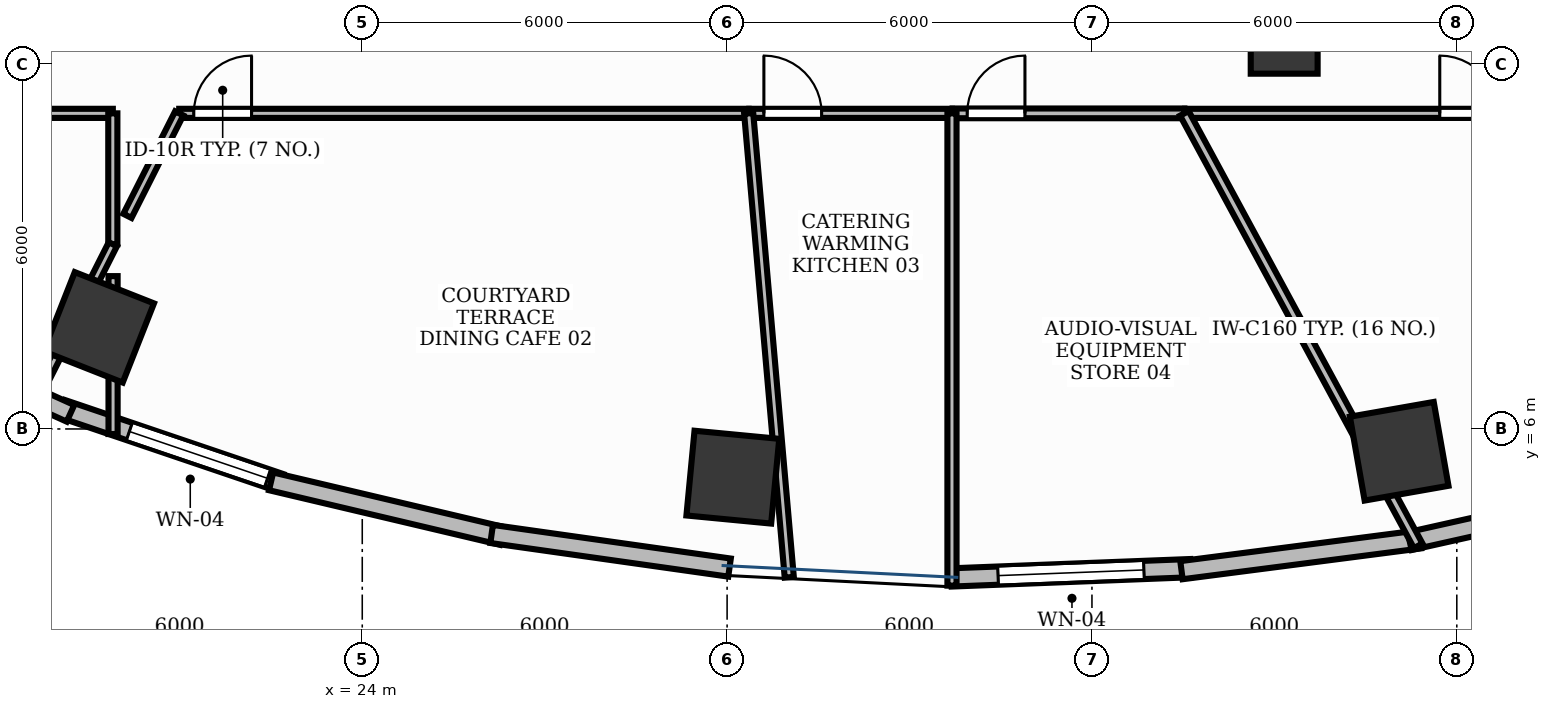
"""IFC4 building model, lengths in metres.
Left out: names, types, materials, properties, quantities, classifications, styles, units other than length and angle.
Written with IfcOpenShell. Run it as: python <this file> out.ifc"""

import sys

from ifc_helpers import new_model, si_unit, direction, frame, frame_2d, origin, origin_2d, place, context, subcontext, project, spatial, rectangle, extrude, element, fill, save


model = new_model("IFC4")
c1 = context("Model", 3, precision=1e-05, world=origin(), true_north=direction((0.0, 1.0)))
c2 = subcontext(c1, "Body", "Model", "MODEL_VIEW")
j1 = project(units=[si_unit("LENGTHUNIT", "METRE"), si_unit("PLANEANGLEUNIT", "RADIAN")], contexts=[c1])
p1 = place(None, origin())
s1 = spatial("IfcSite", under=j1, at=p1, CompositionType="ELEMENT")
p2 = place(p1, origin())
s2 = spatial("IfcBuilding", under=s1, at=p2, CompositionType="ELEMENT")
p3 = place(p2, frame((0.0, 0.0, 20.4)))
s3 = spatial("IfcBuildingStorey", under=s2, at=p3, CompositionType="ELEMENT", Elevation=20.4)
for number, where, z_axis, x_axis in (
    (1, (19.667, 7.671, -0.0), (0.0, 0.0, 1.0), (-0.93, 0.367, 0.0)),
    (2, (30.094, 5.208, -0.0), (0.0, 0.0, 1.0), (-0.995, 0.095, 0.0)),
    (3, (41.052, 5.633, -0.0), (0.0, 0.0, 1.0), (0.985, 0.173, 0.0)),
):
    element("IfcColumn", number, at=place(p3, frame(where, z_axis=z_axis, x_axis=x_axis)), inside=s3, PredefinedType="COLUMN", context=c2, shape_type="SweptSolid", body=[
        extrude(rectangle(XDim=1.4, YDim=1.4, at=origin_2d()), origin(), (0.0, 0.0, 1.0), 5.101),
    ])
p4 = place(p3, frame((39.161, 12.392, -0.0), z_axis=(0.0, 0.0, 1.0), x_axis=(1.0, 0.0, 0.0)))
e4 = element("IfcColumn", 4, at=p4, inside=s3, PredefinedType="COLUMN", context=c2, shape_type="SweptSolid", body=[
    extrude(rectangle(XDim=1.1, YDim=1.1, at=origin_2d()), origin(), (0.0, 0.0, 1.0), 5.101),
])
p5 = place(p3, frame((19.065, 6.333, 0.0), z_axis=(0.0, 0.0, 1.0), x_axis=(0.947034337234, -0.321132315564, 0.0)))
e5 = element("IfcWall", 5, at=p5, inside=s3, PredefinedType="STANDARD", context=c2, shape_type="SweptSolid", body=[
    extrude(rectangle(XDim=3.79, YDim=0.3, at=frame_2d((1.895, 0.0))), origin(), (0.0, 0.0, 1.0), 4.67),
])
p6 = place(p5, frame((1.166, 0.0, 1.5)))
e6 = element("IfcOpeningElement", 6, at=p6, cuts=e5, PredefinedType="OPENING", context=c2, shape_type="SweptSolid", body=[
    extrude(rectangle(XDim=2.4, YDim=1.2, at=frame_2d((1.2, 0.6))), frame((0.0, 0.165, 0.0), z_axis=(0.0, -1.0, 0.0), x_axis=(1.0, 0.0, 0.0)), (0.0, 0.0, 1.0), 0.33),
])
p7 = place(p3, frame((33.687, 3.558, 0.0), z_axis=(0.0, 0.0, 1.0), x_axis=(0.999247008469, 0.038799691558, 0.0)))
e7 = element("IfcWall", 7, at=p7, inside=s3, PredefinedType="STANDARD", context=c2, shape_type="SweptSolid", body=[
    extrude(rectangle(XDim=3.939, YDim=0.3, at=frame_2d((1.969, 0.0))), origin(), (0.0, 0.0, 1.0), 5.1),
])
p8 = place(p7, frame((0.769, 0.0, 1.5)))
e8 = element("IfcOpeningElement", 8, at=p8, cuts=e7, PredefinedType="OPENING", context=c2, shape_type="SweptSolid", body=[
    extrude(rectangle(XDim=2.4, YDim=1.2, at=frame_2d((1.2, 0.6))), frame((0.0, 0.165, 0.0), z_axis=(0.0, -1.0, 0.0), x_axis=(1.0, 0.0, 0.0)), (0.0, 0.0, 1.0), 0.33),
])
p9 = place(p3, frame((15.796, 7.802, 0.0), z_axis=(0.0, 0.0, 1.0), x_axis=(0.910623406862, -0.413237233166, 0.0)))
e9 = element("IfcWall", 9, at=p9, inside=s3, PredefinedType="STANDARD", context=c2, shape_type="SweptSolid", body=[
    extrude(rectangle(XDim=3.74, YDim=0.3, at=frame_2d((1.87, 0.0))), origin(), (0.0, 0.0, 1.0), 5.1),
])
p10 = place(p3, frame((22.5, 5.138, 0.0), z_axis=(0.0, 0.0, 1.0), x_axis=(0.973197600754, -0.229970497863, 0.0)))
e10 = element("IfcWall", 10, at=p10, inside=s3, PredefinedType="STANDARD", context=c2, shape_type="SweptSolid", body=[
    extrude(rectangle(XDim=3.901, YDim=0.3, at=frame_2d((1.951, 0.0))), origin(), (0.0, 0.0, 1.0), 5.1),
])
p11 = place(p3, frame((26.128, 4.273, 0.0), z_axis=(0.0, 0.0, 1.0), x_axis=(0.990165832998, -0.139898617443, 0.0)))
e11 = element("IfcWall", 11, at=p11, inside=s3, PredefinedType="STANDARD", context=c2, shape_type="SweptSolid", body=[
    extrude(rectangle(XDim=3.951, YDim=0.3, at=frame_2d((1.976, 0.0))), origin(), (0.0, 0.0, 1.0), 4.67),
])
p12 = place(p3, frame((37.472, 3.678, 0.0), z_axis=(0.0, 0.0, 1.0), x_axis=(0.991734095036, 0.128310111617, 0.0)))
e12 = element("IfcWall", 12, at=p12, inside=s3, PredefinedType="STANDARD", context=c2, shape_type="SweptSolid", body=[
    extrude(rectangle(XDim=3.956, YDim=0.3, at=frame_2d((1.978, 0.0))), origin(), (0.0, 0.0, 1.0), 5.1),
])
p13 = place(p3, frame((41.225, 4.155, 0.0), z_axis=(0.0, 0.0, 1.0), x_axis=(0.975868573345, 0.218358713032, 0.0)))
e13 = element("IfcWall", 13, at=p13, inside=s3, PredefinedType="STANDARD", context=c2, shape_type="SweptSolid", body=[
    extrude(rectangle(XDim=3.909, YDim=0.3, at=frame_2d((1.954, 0.0))), origin(), (0.0, 0.0, 1.0), 5.1),
])
p14 = place(p3, frame((14.5, 11.19, 0.0), z_axis=(0.0, 0.0, 1.0), x_axis=(1.0, 0.0, 0.0)))
e14 = element("IfcWall", 14, at=p14, inside=s3, PredefinedType="PARTITIONING", context=c2, shape_type="SweptSolid", body=[
    extrude(rectangle(XDim=5.398, YDim=0.15, at=frame_2d((2.699, 0.0))), origin(), (0.0, 0.0, 1.0), 4.11),
])
p15 = place(p14, frame((0.24, 0.0, 0.0)))
e15 = element("IfcOpeningElement", 15, at=p15, cuts=e14, PredefinedType="OPENING", context=c2, shape_type="SweptSolid", body=[
    extrude(rectangle(XDim=0.95, YDim=2.15, at=frame_2d((0.475, 1.075))), frame((0.0, 0.09, 0.0), z_axis=(0.0, -1.0, 0.0), x_axis=(1.0, 0.0, 0.0)), (0.0, 0.0, 1.0), 0.18),
])
p16 = place(p3, frame((20.99, 11.19, 0.0), z_axis=(0.0, 0.0, 1.0), x_axis=(1.0, 0.0, 0.0)))
e16 = element("IfcWall", 16, at=p16, inside=s3, PredefinedType="PARTITIONING", context=c2, shape_type="SweptSolid", body=[
    extrude(rectangle(XDim=9.365, YDim=0.15, at=frame_2d((4.683, 0.0))), origin(), (0.0, 0.0, 1.0), 4.11),
])
p17 = place(p16, frame((0.24, 0.0, 0.0)))
e17 = element("IfcOpeningElement", 17, at=p17, cuts=e16, PredefinedType="OPENING", context=c2, shape_type="SweptSolid", body=[
    extrude(rectangle(XDim=0.95, YDim=2.15, at=frame_2d((0.475, 1.075))), frame((0.0, 0.09, 0.0), z_axis=(0.0, -1.0, 0.0), x_axis=(1.0, 0.0, 0.0)), (0.0, 0.0, 1.0), 0.18),
])
p18 = place(p3, frame((30.365, 11.19, 0.0), z_axis=(0.0, 0.0, 1.0), x_axis=(1.0, 0.0, 0.0)))
e18 = element("IfcWall", 18, at=p18, inside=s3, PredefinedType="PARTITIONING", context=c2, shape_type="SweptSolid", body=[
    extrude(rectangle(XDim=3.333, YDim=0.15, at=frame_2d((1.667, 0.0))), origin(), (0.0, 0.0, 1.0), 4.11),
])
p19 = place(p18, frame((0.24, 0.0, 0.0)))
e19 = element("IfcOpeningElement", 19, at=p19, cuts=e18, PredefinedType="OPENING", context=c2, shape_type="SweptSolid", body=[
    extrude(rectangle(XDim=0.95, YDim=2.15, at=frame_2d((0.475, 1.075))), frame((0.0, 0.09, 0.0), z_axis=(0.0, -1.0, 0.0), x_axis=(1.0, 0.0, 0.0)), (0.0, 0.0, 1.0), 0.18),
])
p20 = place(p3, frame((33.708, 11.19, 0.0), z_axis=(0.0, 0.0, 1.0), x_axis=(1.0, 0.0, 0.0)))
e20 = element("IfcWall", 20, at=p20, inside=s3, PredefinedType="PARTITIONING", context=c2, shape_type="SweptSolid", body=[
    extrude(rectangle(XDim=3.812, YDim=0.16, at=frame_2d((1.906, 0.0))), origin(), (0.0, 0.0, 1.0), 4.11),
])
p21 = place(p20, frame((0.24, 0.0, 0.0)))
e21 = element("IfcOpeningElement", 21, at=p21, cuts=e20, PredefinedType="OPENING", context=c2, shape_type="SweptSolid", body=[
    extrude(rectangle(XDim=0.95, YDim=2.15, at=frame_2d((0.475, 1.075))), frame((0.0, 0.095, 0.0), z_axis=(0.0, -1.0, 0.0), x_axis=(1.0, 0.0, 0.0)), (0.0, 0.0, 1.0), 0.19),
])
p22 = place(p3, frame((37.531, 11.19, 0.0), z_axis=(0.0, 0.0, 1.0), x_axis=(1.0, 0.0, 0.0)))
e22 = element("IfcWall", 22, at=p22, inside=s3, PredefinedType="PARTITIONING", context=c2, shape_type="SweptSolid", body=[
    extrude(rectangle(XDim=5.669, YDim=0.15, at=frame_2d((2.834, 0.0))), origin(), (0.0, 0.0, 1.0), 4.11),
])
p23 = place(p22, frame((4.189, 0.0, 0.0)))
e23 = element("IfcOpeningElement", 23, at=p23, cuts=e22, PredefinedType="OPENING", context=c2, shape_type="SweptSolid", body=[
    extrude(rectangle(XDim=0.95, YDim=2.15, at=frame_2d((0.475, 1.075))), frame((0.0, 0.09, 0.0), z_axis=(0.0, -1.0, 0.0), x_axis=(1.0, 0.0, 0.0)), (0.0, 0.0, 1.0), 0.18),
])
p24 = place(p3, frame((19.898, 11.19, 0.0), z_axis=(0.0, 0.0, 1.0), x_axis=(0.0, -1.0, 0.0)))
e24 = element("IfcWall", 24, at=p24, inside=s3, PredefinedType="PARTITIONING", context=c2, shape_type="SweptSolid", body=[
    extrude(rectangle(XDim=2.152, YDim=0.15, at=frame_2d((1.076, 0.0))), origin(), (0.0, 0.0, 1.0), 4.11),
])
p25 = place(p3, frame((19.898, 9.038, 0.0), z_axis=(0.0, 0.0, 1.0), x_axis=(-0.450893955495, -0.892577526548, 0.0)))
e25 = element("IfcWall", 25, at=p25, inside=s3, PredefinedType="PARTITIONING", context=c2, shape_type="SweptSolid", body=[
    extrude(rectangle(XDim=2.942, YDim=0.15, at=frame_2d((1.471, 0.0))), origin(), (0.0, 0.0, 1.0), 4.11),
])
p26 = place(p3, frame((19.902, 5.917, 0.0), z_axis=(0.0, 0.0, 1.0), x_axis=(0.0, 1.0, 0.0)))
e26 = element("IfcWall", 26, at=p26, inside=s3, PredefinedType="PARTITIONING", context=c2, shape_type="SweptSolid", body=[
    extrude(rectangle(XDim=2.597, YDim=0.15, at=frame_2d((1.298, 0.0))), origin(), (0.0, 0.0, 1.0), 4.11),
])
p27 = place(p3, frame((20.138, 9.504, 0.0), z_axis=(0.0, 0.0, 1.0), x_axis=(0.45082897457, 0.892610349306, 0.0)))
e27 = element("IfcWall", 27, at=p27, inside=s3, PredefinedType="PARTITIONING", context=c2, shape_type="SweptSolid", body=[
    extrude(rectangle(XDim=1.889, YDim=0.15, at=frame_2d((0.944, 0.0))), origin(), (0.0, 0.0, 1.0), 4.11),
])
p28 = place(p3, frame((30.355, 11.19, 0.0), z_axis=(0.0, 0.0, 1.0), x_axis=(0.087160622673, -0.996194271142, 0.0)))
e28 = element("IfcWall", 28, at=p28, inside=s3, PredefinedType="PARTITIONING", context=c2, shape_type="SweptSolid", body=[
    extrude(rectangle(XDim=7.658, YDim=0.15, at=frame_2d((3.829, 0.0))), origin(), (0.0, 0.0, 1.0), 4.11),
])
p29 = place(p3, frame((33.698, 11.19, 0.0), z_axis=(0.0, 0.0, 1.0), x_axis=(0.0, -1.0, 0.0)))
e29 = element("IfcWall", 29, at=p29, inside=s3, PredefinedType="PARTITIONING", context=c2, shape_type="SweptSolid", body=[
    extrude(rectangle(XDim=7.766, YDim=0.15, at=frame_2d((3.883, 0.0))), origin(), (0.0, 0.0, 1.0), 4.11),
])
p30 = place(p3, frame((37.52, 11.19, 0.0), z_axis=(0.0, 0.0, 1.0), x_axis=(0.475637041368, -0.879641634348, 0.0)))
e30 = element("IfcWall", 30, at=p30, inside=s3, PredefinedType="PARTITIONING", context=c2, shape_type="SweptSolid", body=[
    extrude(rectangle(XDim=8.084, YDim=0.16, at=frame_2d((4.042, 0.0))), origin(), (0.0, 0.0, 1.0), 4.11),
])
p31 = place(p6, origin())
e31 = element("IfcWindow", 31, at=p31, inside=s3, PartitioningType="DOUBLE_PANEL_HORIZONTAL", PredefinedType="WINDOW", context=c2, shape_type="SweptSolid", body=[
    extrude(rectangle(XDim=2.4, YDim=1.2, at=frame_2d((1.2, 0.6))), frame((0.0, 0.03, 0.0), z_axis=(0.0, -1.0, 0.0), x_axis=(1.0, 0.0, 0.0)), (0.0, 0.0, 1.0), 0.06),
])
fill(e6, e31)
p32 = place(p8, origin())
e32 = element("IfcWindow", 32, at=p32, inside=s3, PartitioningType="DOUBLE_PANEL_HORIZONTAL", PredefinedType="WINDOW", context=c2, shape_type="SweptSolid", body=[
    extrude(rectangle(XDim=2.4, YDim=1.2, at=frame_2d((1.2, 0.6))), frame((0.0, 0.03, 0.0), z_axis=(0.0, -1.0, 0.0), x_axis=(1.0, 0.0, 0.0)), (0.0, 0.0, 1.0), 0.06),
])
fill(e8, e32)
p33 = place(p17, origin())
e33 = element("IfcDoor", 33, at=p33, inside=s3, OperationType="SINGLE_SWING_RIGHT", PredefinedType="DOOR", context=c2, shape_type="SweptSolid", body=[
    extrude(rectangle(XDim=0.95, YDim=2.15, at=frame_2d((0.475, 1.075))), frame((0.0, 0.025, 0.0), z_axis=(0.0, -1.0, 0.0), x_axis=(1.0, 0.0, 0.0)), (0.0, 0.0, 1.0), 0.05),
])
fill(e17, e33)
p34 = place(p19, origin())
e34 = element("IfcDoor", 34, at=p34, inside=s3, OperationType="SINGLE_SWING_LEFT", PredefinedType="DOOR", context=c2, shape_type="SweptSolid", body=[
    extrude(rectangle(XDim=0.95, YDim=2.15, at=frame_2d((0.475, 1.075))), frame((0.0, 0.025, 0.0), z_axis=(0.0, -1.0, 0.0), x_axis=(1.0, 0.0, 0.0)), (0.0, 0.0, 1.0), 0.05),
])
fill(e19, e34)
p35 = place(p21, origin())
e35 = element("IfcDoor", 35, at=p35, inside=s3, OperationType="SINGLE_SWING_RIGHT", PredefinedType="DOOR", context=c2, shape_type="SweptSolid", body=[
    extrude(rectangle(XDim=0.95, YDim=2.15, at=frame_2d((0.475, 1.075))), frame((0.0, 0.025, 0.0), z_axis=(0.0, -1.0, 0.0), x_axis=(1.0, 0.0, 0.0)), (0.0, 0.0, 1.0), 0.05),
])
fill(e21, e35)
p36 = place(p23, origin())
e36 = element("IfcDoor", 36, at=p36, inside=s3, OperationType="SINGLE_SWING_LEFT", PredefinedType="DOOR", context=c2, shape_type="SweptSolid", body=[
    extrude(rectangle(XDim=0.95, YDim=2.15, at=frame_2d((0.475, 1.075))), frame((0.0, 0.025, 0.0), z_axis=(0.0, -1.0, 0.0), x_axis=(1.0, 0.0, 0.0)), (0.0, 0.0, 1.0), 0.05),
])
fill(e23, e36)
save(model, sys.argv[1])
